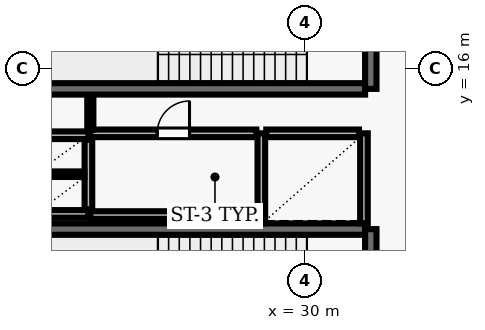
"""IFC4 building model, lengths in metres.
Left out: names, types, materials, properties, quantities, classifications, styles, units other than length and angle.
Written with IfcOpenShell. Run it as: python <this file> out.ifc"""

import sys

from ifc_helpers import new_model, si_unit, direction, frame, frame_2d, origin, place, context, subcontext, project, spatial, rectangle, extrude, element, fill, save


model = new_model("IFC4")
c1 = context("Model", 3, precision=1e-05, world=origin(), true_north=direction((0.0, 1.0)))
c2 = subcontext(c1, "Body", "Model", "MODEL_VIEW")
j1 = project(units=[si_unit("LENGTHUNIT", "METRE"), si_unit("PLANEANGLEUNIT", "RADIAN")], contexts=[c1])
p1 = place(None, origin())
s1 = spatial("IfcSite", under=j1, at=p1, CompositionType="ELEMENT")
p2 = place(p1, origin())
s2 = spatial("IfcBuilding", under=s1, at=p2, CompositionType="ELEMENT")
p3 = place(p2, frame((0.0, 0.0, 5.2)))
s3 = spatial("IfcBuildingStorey", under=s2, at=p3, CompositionType="ELEMENT", Elevation=5.2)
p4 = place(p3, frame((23.22, 15.47, 0.0), z_axis=(0.0, 0.0, 1.0), x_axis=(1.0, 0.0, 0.0)))
e1 = element("IfcWall", 1, at=p4, inside=s3, PredefinedType="SHEAR", context=c2, shape_type="SweptSolid", body=[
    extrude(rectangle(XDim=8.36, YDim=0.3, at=frame_2d((4.18, 0.0))), origin(), (0.0, 0.0, 1.0), 4.92),
])
p5 = place(p3, frame((31.73, 15.47, 0.0), z_axis=(0.0, 0.0, 1.0), x_axis=(0.0, 1.0, 0.0)))
e2 = element("IfcWall", 2, at=p5, inside=s3, PredefinedType="SHEAR", context=c2, shape_type="SweptSolid", body=[
    extrude(rectangle(XDim=3.51, YDim=0.3, at=frame_2d((1.755, 0.0))), origin(), (0.0, 0.0, 1.0), 4.92),
])
p6 = place(p5, frame((1.18, 0.0, 0.0)))
e3 = element("IfcOpeningElement", 3, at=p6, cuts=e2, PredefinedType="OPENING", context=c2, shape_type="SweptSolid", body=[
    extrude(rectangle(XDim=1.15, YDim=2.15, at=frame_2d((0.575, 1.075))), frame((0.0, 0.16, 0.0), z_axis=(0.0, -1.0, 0.0), x_axis=(1.0, 0.0, 0.0)), (0.0, 0.0, 1.0), 0.32),
])
p7 = place(p3, frame((31.58, 11.78, 0.0), z_axis=(0.0, 0.0, 1.0), x_axis=(-1.0, 0.0, 0.0)))
e4 = element("IfcWall", 4, at=p7, inside=s3, PredefinedType="SHEAR", context=c2, shape_type="SweptSolid", body=[
    extrude(rectangle(XDim=8.36, YDim=0.3, at=frame_2d((4.18, 0.0))), origin(), (0.0, 0.0, 1.0), 4.92),
])
p8 = place(p3, frame((31.73, 8.27, 0.0), z_axis=(0.0, 0.0, 1.0), x_axis=(0.0, 1.0, 0.0)))
e5 = element("IfcWall", 5, at=p8, inside=s3, PredefinedType="SHEAR", context=c2, shape_type="SweptSolid", body=[
    extrude(rectangle(XDim=3.51, YDim=0.3, at=frame_2d((1.755, 0.0))), origin(), (0.0, 0.0, 1.0), 4.92),
])
p9 = place(p8, frame((1.18, 0.0, 0.0)))
e6 = element("IfcOpeningElement", 6, at=p9, cuts=e5, PredefinedType="OPENING", context=c2, shape_type="SweptSolid", body=[
    extrude(rectangle(XDim=1.15, YDim=2.15, at=frame_2d((0.575, 1.075))), frame((0.0, 0.16, 0.0), z_axis=(0.0, -1.0, 0.0), x_axis=(1.0, 0.0, 0.0)), (0.0, 0.0, 1.0), 0.32),
])
for number, where, z_axis, x_axis in (
    (7, (28.85, 14.3, 0.0), (0.0, 0.0, 1.0), (0.0, -1.0, 0.0)),
    (8, (31.55, 11.93, 0.0), (0.0, 0.0, 1.0), (0.0, 1.0, 0.0)),
):
    element("IfcWall", number, at=place(p3, frame(where, z_axis=z_axis, x_axis=x_axis)), inside=s3, PredefinedType="SOLIDWALL", context=c2, shape_type="SweptSolid", body=[
        extrude(rectangle(XDim=2.37, YDim=0.2, at=frame_2d((1.185, 0.0))), origin(), (0.0, 0.0, 1.0), 4.92),
    ])
p10 = place(p3, frame((31.42, 14.3, 0.0), z_axis=(0.0, 0.0, 1.0), x_axis=(-1.0, 0.0, 0.0)))
e9 = element("IfcWall", 9, at=p10, inside=s3, PredefinedType="SOLIDWALL", context=c2, shape_type="SweptSolid", body=[
    extrude(rectangle(XDim=2.44, YDim=0.2, at=frame_2d((1.22, 0.0))), origin(), (0.0, 0.0, 1.0), 4.92),
])
for number, where, z_axis, x_axis in (
    (10, (22.9, 14.25, 0.0), (0.0, 0.0, 1.0), (1.0, 0.0, 0.0)),
    (11, (22.9, 12.18, 0.0), (0.0, 0.0, 1.0), (1.0, 0.0, 0.0)),
):
    element("IfcWall", number, at=place(p3, frame(where, z_axis=z_axis, x_axis=x_axis)), inside=s3, PredefinedType="SOLIDWALL", context=c2, shape_type="SweptSolid", body=[
        extrude(rectangle(XDim=1.4, YDim=0.2, at=frame_2d((0.7, 0.0))), origin(), (0.0, 0.0, 1.0), 4.92),
    ])
p11 = place(p3, frame((24.3, 12.3, 0.0), z_axis=(0.0, 0.0, 1.0), x_axis=(0.0, 1.0, 0.0)))
e12 = element("IfcWall", 12, at=p11, inside=s3, PredefinedType="SOLIDWALL", context=c2, shape_type="SweptSolid", body=[
    extrude(rectangle(XDim=1.83, YDim=0.2, at=frame_2d((0.915, 0.0))), origin(), (0.0, 0.0, 1.0), 4.92),
])
p12 = place(p3, frame((23.01, 13.225, 0.0), z_axis=(0.0, 0.0, 1.0), x_axis=(1.0, 0.0, 0.0)))
e13 = element("IfcWall", 13, at=p12, inside=s3, PredefinedType="PARTITIONING", context=c2, shape_type="SweptSolid", body=[
    extrude(rectangle(XDim=1.18, YDim=0.145, at=frame_2d((0.59, 0.0))), origin(), (0.0, 0.0, 1.0), 4.92),
])
p13 = place(p3, frame((24.35, 12.15, 0.0), z_axis=(0.0, 0.0, 1.0), x_axis=(1.0, 0.0, 0.0)))
e14 = element("IfcWall", 14, at=p13, inside=s3, PredefinedType="SOLIDWALL", context=c2, shape_type="SweptSolid", body=[
    extrude(rectangle(XDim=4.37, YDim=0.2, at=frame_2d((2.185, 0.0))), origin(), (0.0, 0.0, 1.0), 4.92),
])
p14 = place(p3, frame((24.35, 14.3, 0.0), z_axis=(0.0, 0.0, 1.0), x_axis=(1.0, 0.0, 0.0)))
e15 = element("IfcWall", 15, at=p14, inside=s3, PredefinedType="SOLIDWALL", context=c2, shape_type="SweptSolid", body=[
    extrude(rectangle(XDim=4.37, YDim=0.2, at=frame_2d((2.185, 0.0))), origin(), (0.0, 0.0, 1.0), 4.92),
])
p15 = place(p14, frame((1.76, 0.0, 0.0)))
e16 = element("IfcOpeningElement", 16, at=p15, cuts=e15, PredefinedType="OPENING", context=c2, shape_type="SweptSolid", body=[
    extrude(rectangle(XDim=0.85, YDim=2.1, at=frame_2d((0.425, 1.05))), frame((0.0, 0.11, 0.0), z_axis=(0.0, -1.0, 0.0), x_axis=(1.0, 0.0, 0.0)), (0.0, 0.0, 1.0), 0.22),
])
p16 = place(p3, frame((24.35, 15.29, 0.0), z_axis=(0.0, 0.0, 1.0), x_axis=(0.0, -1.0, 0.0)))
e17 = element("IfcWall", 17, at=p16, inside=s3, PredefinedType="PARTITIONING", context=c2, shape_type="SweptSolid", body=[
    extrude(rectangle(XDim=0.895, YDim=0.16, at=frame_2d((0.448, 0.0))), origin(), (0.0, 0.0, 1.0), 4.92),
])
p17 = place(p15, origin())
e18 = element("IfcDoor", 18, at=p17, inside=s3, OperationType="SINGLE_SWING_RIGHT", PredefinedType="DOOR", context=c2, shape_type="SweptSolid", body=[
    extrude(rectangle(XDim=0.85, YDim=2.1, at=frame_2d((0.425, 1.05))), frame((0.0, 0.025, 0.0), z_axis=(0.0, -1.0, 0.0), x_axis=(1.0, 0.0, 0.0)), (0.0, 0.0, 1.0), 0.05),
])
fill(e16, e18)
save(model, sys.argv[1])
